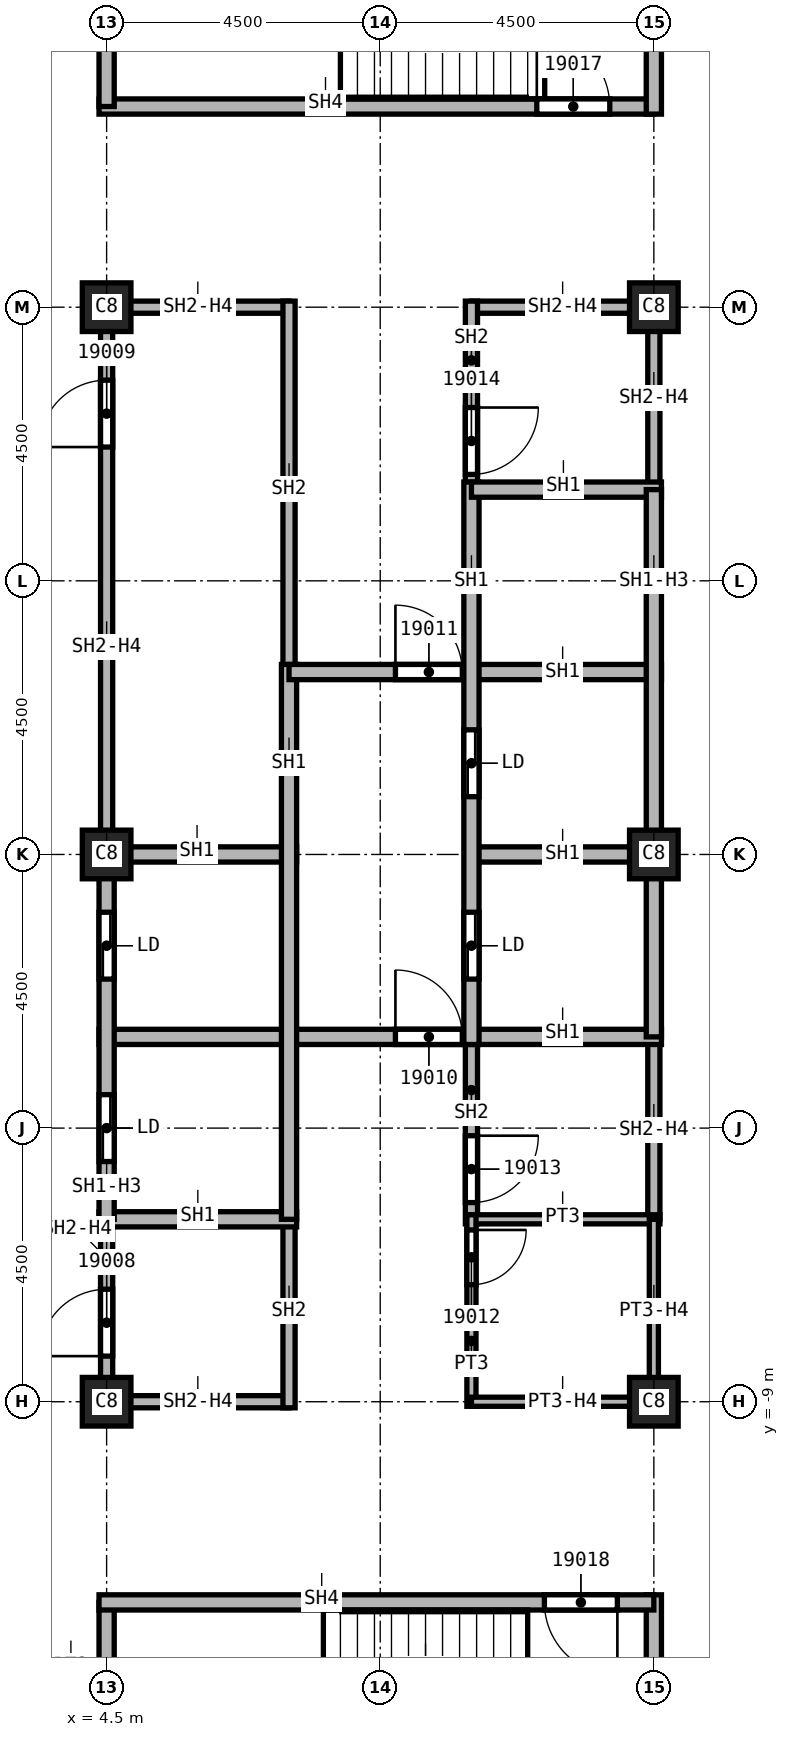
"""IFC4 building model, lengths in metres.
Left out: names, types, materials, properties, quantities, classifications, styles, units other than length and angle.
Written with IfcOpenShell. Run it as: python <this file> out.ifc"""

import sys

from ifc_helpers import new_model, si_unit, direction, frame, frame_2d, origin, origin_2d, place, context, subcontext, project, spatial, rectangle, extrude, element, fill, save


model = new_model("IFC4")
c1 = context("Model", 3, precision=1e-05, world=origin(), true_north=direction((0.0, 1.0)))
c2 = subcontext(c1, "Body", "Model", "MODEL_VIEW")
j1 = project(units=[si_unit("LENGTHUNIT", "METRE"), si_unit("PLANEANGLEUNIT", "RADIAN")], contexts=[c1])
p1 = place(None, origin())
s1 = spatial("IfcSite", under=j1, at=p1, CompositionType="ELEMENT")
p2 = place(p1, origin())
s2 = spatial("IfcBuilding", under=s1, at=p2, CompositionType="ELEMENT")
p3 = place(p2, frame((0.0, 0.0, 282.0)))
s3 = spatial("IfcBuildingStorey", under=s2, at=p3, CompositionType="ELEMENT", Elevation=282.0)
for number, where, z_axis, x_axis in (
    (1, (4.5, 0.0, 0.0), (0.0, 0.0, 1.0), (1.0, 0.0, 0.0)),
    (2, (4.5, 9.0, 0.0), (0.0, 0.0, 1.0), (1.0, 0.0, 0.0)),
    (3, (4.5, -9.0, 0.0), (0.0, 0.0, 1.0), (1.0, 0.0, 0.0)),
    (4, (13.5, 0.0, 0.0), (0.0, 0.0, 1.0), (1.0, 0.0, 0.0)),
    (5, (13.5, 9.0, 0.0), (0.0, 0.0, 1.0), (1.0, 0.0, 0.0)),
    (6, (13.5, -9.0, 0.0), (0.0, 0.0, 1.0), (1.0, 0.0, 0.0)),
):
    element("IfcColumn", number, at=place(p3, frame(where, z_axis=z_axis, x_axis=x_axis)), inside=s3, PredefinedType="COLUMN", context=c2, shape_type="SweptSolid", body=[
        extrude(rectangle(XDim=0.8, YDim=0.8, at=origin_2d()), origin(), (0.0, 0.0, 1.0), 3.72),
    ])
p4 = place(p3, frame((4.5, -9.1, 0.0), z_axis=(0.0, 0.0, 1.0), x_axis=(0.0, 1.0, 0.0)))
e7 = element("IfcWall", 7, at=p4, inside=s3, PredefinedType="SOLIDWALL", context=c2, shape_type="SweptSolid", body=[
    extrude(rectangle(XDim=3.1, YDim=0.2, at=frame_2d((1.55, 0.0))), origin(), (0.0, 0.0, 1.0), 3.042),
])
p5 = place(p4, frame((0.85, 0.0, 0.0)))
e8 = element("IfcOpeningElement", 8, at=p5, cuts=e7, PredefinedType="OPENING", context=c2, shape_type="SweptSolid", body=[
    extrude(rectangle(XDim=1.1, YDim=2.1, at=frame_2d((0.55, 1.05))), frame((0.0, 0.1, 0.0), z_axis=(0.0, -1.0, 0.0), x_axis=(1.0, 0.0, 0.0)), (0.0, 0.0, 1.0), 0.2),
])
p6 = place(p3, frame((4.5, 0.0, 0.0), z_axis=(0.0, 0.0, 1.0), x_axis=(0.0, 1.0, 0.0)))
e9 = element("IfcWall", 9, at=p6, inside=s3, PredefinedType="SOLIDWALL", context=c2, shape_type="SweptSolid", body=[
    extrude(rectangle(XDim=9.1, YDim=0.2, at=frame_2d((4.55, 0.0))), origin(), (0.0, 0.0, 1.0), 3.042),
])
p7 = place(p6, frame((6.7, 0.0, 0.0)))
e10 = element("IfcOpeningElement", 10, at=p7, cuts=e9, PredefinedType="OPENING", context=c2, shape_type="SweptSolid", body=[
    extrude(rectangle(XDim=1.1, YDim=2.1, at=frame_2d((0.55, 1.05))), frame((0.0, 0.1, 0.0), z_axis=(0.0, -1.0, 0.0), x_axis=(1.0, 0.0, 0.0)), (0.0, 0.0, 1.0), 0.2),
])
for number, where, z_axis, x_axis in (
    (11, (4.5, 9.0, 0.0), (0.0, 0.0, 1.0), (1.0, 0.0, 0.0)),
    (12, (7.5, -9.0, 0.0), (0.0, 0.0, 1.0), (-1.0, 0.0, 0.0)),
):
    element("IfcWall", number, at=place(p3, frame(where, z_axis=z_axis, x_axis=x_axis)), inside=s3, PredefinedType="SOLIDWALL", context=c2, shape_type="SweptSolid", body=[
        extrude(rectangle(XDim=3.0, YDim=0.2, at=frame_2d((1.5, 0.0))), origin(), (0.0, 0.0, 1.0), 3.042),
    ])
p8 = place(p3, frame((7.5, -6.0, 0.0), z_axis=(0.0, 0.0, 1.0), x_axis=(0.0, -1.0, 0.0)))
e13 = element("IfcWall", 13, at=p8, inside=s3, PredefinedType="SOLIDWALL", context=c2, shape_type="SweptSolid", body=[
    extrude(rectangle(XDim=3.1, YDim=0.2, at=frame_2d((1.55, 0.0))), origin(), (0.0, 0.0, 1.0), 3.72),
])
p9 = place(p3, frame((7.5, 9.1, 0.0), z_axis=(0.0, 0.0, 1.0), x_axis=(0.0, -1.0, 0.0)))
e14 = element("IfcWall", 14, at=p9, inside=s3, PredefinedType="SOLIDWALL", context=c2, shape_type="SweptSolid", body=[
    extrude(rectangle(XDim=6.225, YDim=0.2, at=frame_2d((3.113, 0.0))), origin(), (0.0, 0.0, 1.0), 3.72),
])
p10 = place(p3, frame((10.5, -2.875, 0.0), z_axis=(0.0, 0.0, 1.0), x_axis=(0.0, -1.0, 0.0)))
e15 = element("IfcWall", 15, at=p10, inside=s3, PredefinedType="SOLIDWALL", context=c2, shape_type="SweptSolid", body=[
    extrude(rectangle(XDim=3.2, YDim=0.2, at=frame_2d((1.6, 0.0))), origin(), (0.0, 0.0, 1.0), 3.72),
])
p11 = place(p10, frame((1.75, 0.0, 0.0)))
e16 = element("IfcOpeningElement", 16, at=p11, cuts=e15, PredefinedType="OPENING", context=c2, shape_type="SweptSolid", body=[
    extrude(rectangle(XDim=1.1, YDim=2.1, at=frame_2d((0.55, 1.05))), frame((0.0, 0.1, 0.0), z_axis=(0.0, -1.0, 0.0), x_axis=(1.0, 0.0, 0.0)), (0.0, 0.0, 1.0), 0.2),
])
p12 = place(p3, frame((10.5, 9.0, 0.0), z_axis=(0.0, 0.0, 1.0), x_axis=(1.0, 0.0, 0.0)))
e17 = element("IfcWall", 17, at=p12, inside=s3, PredefinedType="SOLIDWALL", context=c2, shape_type="SweptSolid", body=[
    extrude(rectangle(XDim=3.0, YDim=0.2, at=frame_2d((1.5, 0.0))), origin(), (0.0, 0.0, 1.0), 3.042),
])
p13 = place(p3, frame((10.5, 9.1, 0.0), z_axis=(0.0, 0.0, 1.0), x_axis=(0.0, -1.0, 0.0)))
e18 = element("IfcWall", 18, at=p13, inside=s3, PredefinedType="SOLIDWALL", context=c2, shape_type="SweptSolid", body=[
    extrude(rectangle(XDim=3.225, YDim=0.2, at=frame_2d((1.613, 0.0))), origin(), (0.0, 0.0, 1.0), 3.72),
])
p14 = place(p13, frame((1.75, 0.0, 0.0)))
e19 = element("IfcOpeningElement", 19, at=p14, cuts=e18, PredefinedType="OPENING", context=c2, shape_type="SweptSolid", body=[
    extrude(rectangle(XDim=1.1, YDim=2.1, at=frame_2d((0.55, 1.05))), frame((0.0, 0.1, 0.0), z_axis=(0.0, -1.0, 0.0), x_axis=(1.0, 0.0, 0.0)), (0.0, 0.0, 1.0), 0.2),
])
p15 = place(p3, frame((13.5, -3.0, 0.0), z_axis=(0.0, 0.0, 1.0), x_axis=(0.0, -1.0, 0.0)))
e20 = element("IfcWall", 20, at=p15, inside=s3, PredefinedType="SOLIDWALL", context=c2, shape_type="SweptSolid", body=[
    extrude(rectangle(XDim=3.0, YDim=0.2, at=frame_2d((1.5, 0.0))), origin(), (0.0, 0.0, 1.0), 3.042),
])
p16 = place(p3, frame((13.5, 9.1, 0.0), z_axis=(0.0, 0.0, 1.0), x_axis=(0.0, -1.0, 0.0)))
e21 = element("IfcWall", 21, at=p16, inside=s3, PredefinedType="SOLIDWALL", context=c2, shape_type="SweptSolid", body=[
    extrude(rectangle(XDim=3.1, YDim=0.2, at=frame_2d((1.55, 0.0))), origin(), (0.0, 0.0, 1.0), 3.042),
])
p17 = place(p3, frame((4.375, -6.0, 0.0), z_axis=(0.0, 0.0, 1.0), x_axis=(1.0, 0.0, 0.0)))
e22 = element("IfcWall", 22, at=p17, inside=s3, PredefinedType="SOLIDWALL", context=c2, shape_type="SweptSolid", body=[
    extrude(rectangle(XDim=3.25, YDim=0.25, at=frame_2d((1.625, 0.0))), origin(), (0.0, 0.0, 1.0), 3.72),
])
p18 = place(p3, frame((4.375, -3.0, 0.0), z_axis=(0.0, 0.0, 1.0), x_axis=(1.0, 0.0, 0.0)))
e23 = element("IfcWall", 23, at=p18, inside=s3, PredefinedType="SOLIDWALL", context=c2, shape_type="SweptSolid", body=[
    extrude(rectangle(XDim=9.25, YDim=0.25, at=frame_2d((4.625, 0.0))), origin(), (0.0, 0.0, 1.0), 3.72),
])
p19 = place(p18, frame((4.875, 0.0, 0.0)))
e24 = element("IfcOpeningElement", 24, at=p19, cuts=e23, PredefinedType="OPENING", context=c2, shape_type="SweptSolid", body=[
    extrude(rectangle(XDim=1.1, YDim=2.1, at=frame_2d((0.55, 1.05))), frame((0.0, 0.125, 0.0), z_axis=(0.0, -1.0, 0.0), x_axis=(1.0, 0.0, 0.0)), (0.0, 0.0, 1.0), 0.25),
])
p20 = place(p3, frame((4.375, 0.0, 0.0), z_axis=(0.0, 0.0, 1.0), x_axis=(1.0, 0.0, 0.0)))
e25 = element("IfcWall", 25, at=p20, inside=s3, PredefinedType="SOLIDWALL", context=c2, shape_type="SweptSolid", body=[
    extrude(rectangle(XDim=3.25, YDim=0.25, at=frame_2d((1.625, 0.0))), origin(), (0.0, 0.0, 1.0), 3.72),
])
p21 = place(p3, frame((4.5, -6.0, 0.0), z_axis=(0.0, 0.0, 1.0), x_axis=(0.0, 1.0, 0.0)))
e26 = element("IfcWall", 26, at=p21, inside=s3, PredefinedType="SOLIDWALL", context=c2, shape_type="SweptSolid", body=[
    extrude(rectangle(XDim=6.0, YDim=0.25, at=frame_2d((3.0, 0.0))), origin(), (0.0, 0.0, 1.0), 3.042),
])
p22 = place(p21, frame((0.95, 0.0, 0.0)))
e27 = element("IfcOpeningElement", 27, at=p22, cuts=e26, PredefinedType="OPENING", context=c2, shape_type="SweptSolid", body=[
    extrude(rectangle(XDim=1.1, YDim=2.1, at=frame_2d((0.55, 1.05))), frame((0.0, 0.125, 0.0), z_axis=(0.0, -1.0, 0.0), x_axis=(1.0, 0.0, 0.0)), (0.0, 0.0, 1.0), 0.25),
])
p23 = place(p21, frame((3.95, 0.0, 0.0)))
e28 = element("IfcOpeningElement", 28, at=p23, cuts=e26, PredefinedType="OPENING", context=c2, shape_type="SweptSolid", body=[
    extrude(rectangle(XDim=1.1, YDim=2.1, at=frame_2d((0.55, 1.05))), frame((0.0, 0.125, 0.0), z_axis=(0.0, -1.0, 0.0), x_axis=(1.0, 0.0, 0.0)), (0.0, 0.0, 1.0), 0.25),
])
p24 = place(p3, frame((7.5, 3.125, 0.0), z_axis=(0.0, 0.0, 1.0), x_axis=(0.0, -1.0, 0.0)))
e29 = element("IfcWall", 29, at=p24, inside=s3, PredefinedType="SOLIDWALL", context=c2, shape_type="SweptSolid", body=[
    extrude(rectangle(XDim=9.125, YDim=0.25, at=frame_2d((4.562, 0.0))), origin(), (0.0, 0.0, 1.0), 3.72),
])
p25 = place(p3, frame((7.5, 3.0, 0.0), z_axis=(0.0, 0.0, 1.0), x_axis=(1.0, 0.0, 0.0)))
e30 = element("IfcWall", 30, at=p25, inside=s3, PredefinedType="SOLIDWALL", context=c2, shape_type="SweptSolid", body=[
    extrude(rectangle(XDim=6.125, YDim=0.25, at=frame_2d((3.062, 0.0))), origin(), (0.0, 0.0, 1.0), 3.72),
])
p26 = place(p25, frame((1.75, 0.0, 0.0)))
e31 = element("IfcOpeningElement", 31, at=p26, cuts=e30, PredefinedType="OPENING", context=c2, shape_type="SweptSolid", body=[
    extrude(rectangle(XDim=1.1, YDim=2.1, at=frame_2d((0.55, 1.05))), frame((0.0, 0.125, 0.0), z_axis=(0.0, -1.0, 0.0), x_axis=(1.0, 0.0, 0.0)), (0.0, 0.0, 1.0), 0.25),
])
p27 = place(p3, frame((10.5, 0.0, 0.0), z_axis=(0.0, 0.0, 1.0), x_axis=(1.0, 0.0, 0.0)))
e32 = element("IfcWall", 32, at=p27, inside=s3, PredefinedType="SOLIDWALL", context=c2, shape_type="SweptSolid", body=[
    extrude(rectangle(XDim=3.125, YDim=0.25, at=frame_2d((1.562, 0.0))), origin(), (0.0, 0.0, 1.0), 3.72),
])
p28 = place(p3, frame((10.5, 6.125, 0.0), z_axis=(0.0, 0.0, 1.0), x_axis=(0.0, -1.0, 0.0)))
e33 = element("IfcWall", 33, at=p28, inside=s3, PredefinedType="SOLIDWALL", context=c2, shape_type="SweptSolid", body=[
    extrude(rectangle(XDim=9.25, YDim=0.25, at=frame_2d((4.625, 0.0))), origin(), (0.0, 0.0, 1.0), 3.72),
])
p29 = place(p28, frame((7.075, 0.0, 0.0)))
e34 = element("IfcOpeningElement", 34, at=p29, cuts=e33, PredefinedType="OPENING", context=c2, shape_type="SweptSolid", body=[
    extrude(rectangle(XDim=1.1, YDim=2.1, at=frame_2d((0.55, 1.05))), frame((0.0, 0.125, 0.0), z_axis=(0.0, -1.0, 0.0), x_axis=(1.0, 0.0, 0.0)), (0.0, 0.0, 1.0), 0.25),
])
p30 = place(p28, frame((4.075, 0.0, 0.0)))
e35 = element("IfcOpeningElement", 35, at=p30, cuts=e33, PredefinedType="OPENING", context=c2, shape_type="SweptSolid", body=[
    extrude(rectangle(XDim=1.1, YDim=2.1, at=frame_2d((0.55, 1.05))), frame((0.0, 0.125, 0.0), z_axis=(0.0, -1.0, 0.0), x_axis=(1.0, 0.0, 0.0)), (0.0, 0.0, 1.0), 0.25),
])
p31 = place(p3, frame((10.5, 6.0, 0.0), z_axis=(0.0, 0.0, 1.0), x_axis=(1.0, 0.0, 0.0)))
e36 = element("IfcWall", 36, at=p31, inside=s3, PredefinedType="SOLIDWALL", context=c2, shape_type="SweptSolid", body=[
    extrude(rectangle(XDim=3.125, YDim=0.25, at=frame_2d((1.562, 0.0))), origin(), (0.0, 0.0, 1.0), 3.72),
])
p32 = place(p3, frame((13.5, 6.0, 0.0), z_axis=(0.0, 0.0, 1.0), x_axis=(0.0, -1.0, 0.0)))
e37 = element("IfcWall", 37, at=p32, inside=s3, PredefinedType="SOLIDWALL", context=c2, shape_type="SweptSolid", body=[
    extrude(rectangle(XDim=9.0, YDim=0.25, at=frame_2d((4.5, 0.0))), origin(), (0.0, 0.0, 1.0), 3.042),
])
p33 = place(p3, frame((4.375, 12.3, 0.0), z_axis=(0.0, 0.0, 1.0), x_axis=(1.0, 0.0, 0.0)))
e38 = element("IfcWall", 38, at=p33, inside=s3, PredefinedType="SOLIDWALL", context=c2, shape_type="SweptSolid", body=[
    extrude(rectangle(XDim=9.125, YDim=0.25, at=frame_2d((4.562, 0.0))), origin(), (0.0, 0.0, 1.0), 3.72),
])
p34 = place(p33, frame((7.2, 0.0, 0.0)))
e39 = element("IfcOpeningElement", 39, at=p34, cuts=e38, PredefinedType="OPENING", context=c2, shape_type="SweptSolid", body=[
    extrude(rectangle(XDim=1.2, YDim=2.1, at=frame_2d((0.6, 1.05))), frame((0.0, 0.125, 0.0), z_axis=(0.0, -1.0, 0.0), x_axis=(1.0, 0.0, 0.0)), (0.0, 0.0, 1.0), 0.25),
])
for number, where, z_axis, x_axis in (
    (40, (4.5, -16.8, 0.0), (0.0, 0.0, 1.0), (0.0, 1.0, 0.0)),
    (41, (4.5, 12.3, 0.0), (0.0, 0.0, 1.0), (0.0, 1.0, 0.0)),
):
    element("IfcWall", number, at=place(p3, frame(where, z_axis=z_axis, x_axis=x_axis)), inside=s3, PredefinedType="SOLIDWALL", context=c2, shape_type="SweptSolid", body=[
        extrude(rectangle(XDim=4.5, YDim=0.25, at=frame_2d((2.25, 0.0))), origin(), (0.0, 0.0, 1.0), 3.72),
    ])
p35 = place(p3, frame((13.5, -16.925, 0.0), z_axis=(0.0, 0.0, 1.0), x_axis=(0.0, 1.0, 0.0)))
e42 = element("IfcWall", 42, at=p35, inside=s3, PredefinedType="SOLIDWALL", context=c2, shape_type="SweptSolid", body=[
    extrude(rectangle(XDim=4.75, YDim=0.25, at=frame_2d((2.375, 0.0))), origin(), (0.0, 0.0, 1.0), 3.72),
])
p36 = place(p3, frame((13.5, -12.3, 0.0), z_axis=(0.0, 0.0, 1.0), x_axis=(-1.0, 0.0, 0.0)))
e43 = element("IfcWall", 43, at=p36, inside=s3, PredefinedType="SOLIDWALL", context=c2, shape_type="SweptSolid", body=[
    extrude(rectangle(XDim=9.125, YDim=0.25, at=frame_2d((4.562, 0.0))), origin(), (0.0, 0.0, 1.0), 3.72),
])
p37 = place(p36, frame((0.6, 0.0, 0.0)))
e44 = element("IfcOpeningElement", 44, at=p37, cuts=e43, PredefinedType="OPENING", context=c2, shape_type="SweptSolid", body=[
    extrude(rectangle(XDim=1.2, YDim=2.1, at=frame_2d((0.6, 1.05))), frame((0.0, 0.125, 0.0), z_axis=(0.0, -1.0, 0.0), x_axis=(1.0, 0.0, 0.0)), (0.0, 0.0, 1.0), 0.25),
])
p38 = place(p3, frame((13.5, 12.175, 0.0), z_axis=(0.0, 0.0, 1.0), x_axis=(0.0, 1.0, 0.0)))
e45 = element("IfcWall", 45, at=p38, inside=s3, PredefinedType="SOLIDWALL", context=c2, shape_type="SweptSolid", body=[
    extrude(rectangle(XDim=4.75, YDim=0.25, at=frame_2d((2.375, 0.0))), origin(), (0.0, 0.0, 1.0), 3.72),
])
p39 = place(p3, frame((10.5, -6.0, 0.0), z_axis=(0.0, 0.0, 1.0), x_axis=(1.0, 0.0, 0.0)))
e46 = element("IfcWall", 46, at=p39, inside=s3, PredefinedType="PARTITIONING", context=c2, shape_type="SweptSolid", body=[
    extrude(rectangle(XDim=3.1, YDim=0.15, at=frame_2d((1.55, 0.0))), origin(), (0.0, 0.0, 1.0), 3.72),
])
p40 = place(p3, frame((10.5, -5.925, 0.0), z_axis=(0.0, 0.0, 1.0), x_axis=(0.0, -1.0, 0.0)))
e47 = element("IfcWall", 47, at=p40, inside=s3, PredefinedType="PARTITIONING", context=c2, shape_type="SweptSolid", body=[
    extrude(rectangle(XDim=3.15, YDim=0.15, at=frame_2d((1.575, 0.0))), origin(), (0.0, 0.0, 1.0), 3.72),
])
p41 = place(p40, frame((0.25, 0.0, 0.0)))
e48 = element("IfcOpeningElement", 48, at=p41, cuts=e47, PredefinedType="OPENING", context=c2, shape_type="SweptSolid", body=[
    extrude(rectangle(XDim=0.9, YDim=2.1, at=frame_2d((0.45, 1.05))), frame((0.0, 0.075, 0.0), z_axis=(0.0, -1.0, 0.0), x_axis=(1.0, 0.0, 0.0)), (0.0, 0.0, 1.0), 0.15),
])
p42 = place(p3, frame((13.5, -9.0, 0.0), z_axis=(0.0, 0.0, 1.0), x_axis=(-1.0, 0.0, 0.0)))
e49 = element("IfcWall", 49, at=p42, inside=s3, PredefinedType="PARTITIONING", context=c2, shape_type="SweptSolid", body=[
    extrude(rectangle(XDim=3.0, YDim=0.15, at=frame_2d((1.5, 0.0))), origin(), (0.0, 0.0, 1.0), 3.042),
])
p43 = place(p3, frame((13.5, -6.0, 0.0), z_axis=(0.0, 0.0, 1.0), x_axis=(0.0, -1.0, 0.0)))
e50 = element("IfcWall", 50, at=p43, inside=s3, PredefinedType="PARTITIONING", context=c2, shape_type="SweptSolid", body=[
    extrude(rectangle(XDim=3.075, YDim=0.15, at=frame_2d((1.538, 0.0))), origin(), (0.0, 0.0, 1.0), 3.042),
])
p44 = place(p5, origin())
e51 = element("IfcDoor", 51, at=p44, inside=s3, OperationType="SINGLE_SWING_LEFT", PredefinedType="DOOR", context=c2, shape_type="SweptSolid", body=[
    extrude(rectangle(XDim=1.1, YDim=2.1, at=frame_2d((0.55, 1.05))), frame((0.0, 0.025, 0.0), z_axis=(0.0, -1.0, 0.0), x_axis=(1.0, 0.0, 0.0)), (0.0, 0.0, 1.0), 0.05),
])
fill(e8, e51)
p45 = place(p7, origin())
e52 = element("IfcDoor", 52, at=p45, inside=s3, OperationType="SINGLE_SWING_RIGHT", PredefinedType="DOOR", context=c2, shape_type="SweptSolid", body=[
    extrude(rectangle(XDim=1.1, YDim=2.1, at=frame_2d((0.55, 1.05))), frame((0.0, 0.025, 0.0), z_axis=(0.0, -1.0, 0.0), x_axis=(1.0, 0.0, 0.0)), (0.0, 0.0, 1.0), 0.05),
])
fill(e10, e52)
p46 = place(p19, origin())
e53 = element("IfcDoor", 53, at=p46, inside=s3, OperationType="SINGLE_SWING_LEFT", PredefinedType="DOOR", context=c2, shape_type="SweptSolid", body=[
    extrude(rectangle(XDim=1.1, YDim=2.1, at=frame_2d((0.55, 1.05))), frame((0.0, 0.025, 0.0), z_axis=(0.0, -1.0, 0.0), x_axis=(1.0, 0.0, 0.0)), (0.0, 0.0, 1.0), 0.05),
])
fill(e24, e53)
p47 = place(p26, origin())
e54 = element("IfcDoor", 54, at=p47, inside=s3, OperationType="SINGLE_SWING_RIGHT", PredefinedType="DOOR", context=c2, shape_type="SweptSolid", body=[
    extrude(rectangle(XDim=1.1, YDim=2.1, at=frame_2d((0.55, 1.05))), frame((0.0, 0.025, 0.0), z_axis=(0.0, -1.0, 0.0), x_axis=(1.0, 0.0, 0.0)), (0.0, 0.0, 1.0), 0.05),
])
fill(e31, e54)
p48 = place(p41, origin())
e55 = element("IfcDoor", 55, at=p48, inside=s3, OperationType="SINGLE_SWING_LEFT", PredefinedType="DOOR", context=c2, shape_type="SweptSolid", body=[
    extrude(rectangle(XDim=0.9, YDim=2.1, at=frame_2d((0.45, 1.05))), frame((0.0, 0.025, 0.0), z_axis=(0.0, -1.0, 0.0), x_axis=(1.0, 0.0, 0.0)), (0.0, 0.0, 1.0), 0.05),
])
fill(e48, e55)
p49 = place(p11, origin())
e56 = element("IfcDoor", 56, at=p49, inside=s3, OperationType="SINGLE_SWING_RIGHT", PredefinedType="DOOR", context=c2, shape_type="SweptSolid", body=[
    extrude(rectangle(XDim=1.1, YDim=2.1, at=frame_2d((0.55, 1.05))), frame((0.0, 0.025, 0.0), z_axis=(0.0, -1.0, 0.0), x_axis=(1.0, 0.0, 0.0)), (0.0, 0.0, 1.0), 0.05),
])
fill(e16, e56)
p50 = place(p14, origin())
e57 = element("IfcDoor", 57, at=p50, inside=s3, OperationType="SINGLE_SWING_LEFT", PredefinedType="DOOR", context=c2, shape_type="SweptSolid", body=[
    extrude(rectangle(XDim=1.1, YDim=2.1, at=frame_2d((0.55, 1.05))), frame((0.0, 0.025, 0.0), z_axis=(0.0, -1.0, 0.0), x_axis=(1.0, 0.0, 0.0)), (0.0, 0.0, 1.0), 0.05),
])
fill(e19, e57)
p51 = place(p34, origin())
e58 = element("IfcDoor", 58, at=p51, inside=s3, OperationType="SINGLE_SWING_RIGHT", PredefinedType="DOOR", context=c2, shape_type="SweptSolid", body=[
    extrude(rectangle(XDim=1.2, YDim=2.1, at=frame_2d((0.6, 1.05))), frame((0.0, 0.025, 0.0), z_axis=(0.0, -1.0, 0.0), x_axis=(1.0, 0.0, 0.0)), (0.0, 0.0, 1.0), 0.05),
])
fill(e39, e58)
p52 = place(p37, origin())
e59 = element("IfcDoor", 59, at=p52, inside=s3, OperationType="SINGLE_SWING_LEFT", PredefinedType="DOOR", context=c2, shape_type="SweptSolid", body=[
    extrude(rectangle(XDim=1.2, YDim=2.1, at=frame_2d((0.6, 1.05))), frame((0.0, 0.025, 0.0), z_axis=(0.0, -1.0, 0.0), x_axis=(1.0, 0.0, 0.0)), (0.0, 0.0, 1.0), 0.05),
])
fill(e44, e59)
p53 = place(p22, origin())
e60 = element("IfcDoor", 60, at=p53, inside=s3, OperationType="SLIDING_TO_LEFT", PredefinedType="DOOR", context=c2, shape_type="SweptSolid", body=[
    extrude(rectangle(XDim=1.1, YDim=2.1, at=frame_2d((0.55, 1.05))), frame((0.0, 0.025, 0.0), z_axis=(0.0, -1.0, 0.0), x_axis=(1.0, 0.0, 0.0)), (0.0, 0.0, 1.0), 0.05),
])
fill(e27, e60)
p54 = place(p23, origin())
e61 = element("IfcDoor", 61, at=p54, inside=s3, OperationType="SLIDING_TO_LEFT", PredefinedType="DOOR", context=c2, shape_type="SweptSolid", body=[
    extrude(rectangle(XDim=1.1, YDim=2.1, at=frame_2d((0.55, 1.05))), frame((0.0, 0.025, 0.0), z_axis=(0.0, -1.0, 0.0), x_axis=(1.0, 0.0, 0.0)), (0.0, 0.0, 1.0), 0.05),
])
fill(e28, e61)
p55 = place(p29, origin())
e62 = element("IfcDoor", 62, at=p55, inside=s3, OperationType="SLIDING_TO_LEFT", PredefinedType="DOOR", context=c2, shape_type="SweptSolid", body=[
    extrude(rectangle(XDim=1.1, YDim=2.1, at=frame_2d((0.55, 1.05))), frame((0.0, 0.025, 0.0), z_axis=(0.0, -1.0, 0.0), x_axis=(1.0, 0.0, 0.0)), (0.0, 0.0, 1.0), 0.05),
])
fill(e34, e62)
p56 = place(p30, origin())
e63 = element("IfcDoor", 63, at=p56, inside=s3, OperationType="SLIDING_TO_LEFT", PredefinedType="DOOR", context=c2, shape_type="SweptSolid", body=[
    extrude(rectangle(XDim=1.1, YDim=2.1, at=frame_2d((0.55, 1.05))), frame((0.0, 0.025, 0.0), z_axis=(0.0, -1.0, 0.0), x_axis=(1.0, 0.0, 0.0)), (0.0, 0.0, 1.0), 0.05),
])
fill(e35, e63)
save(model, sys.argv[1])
